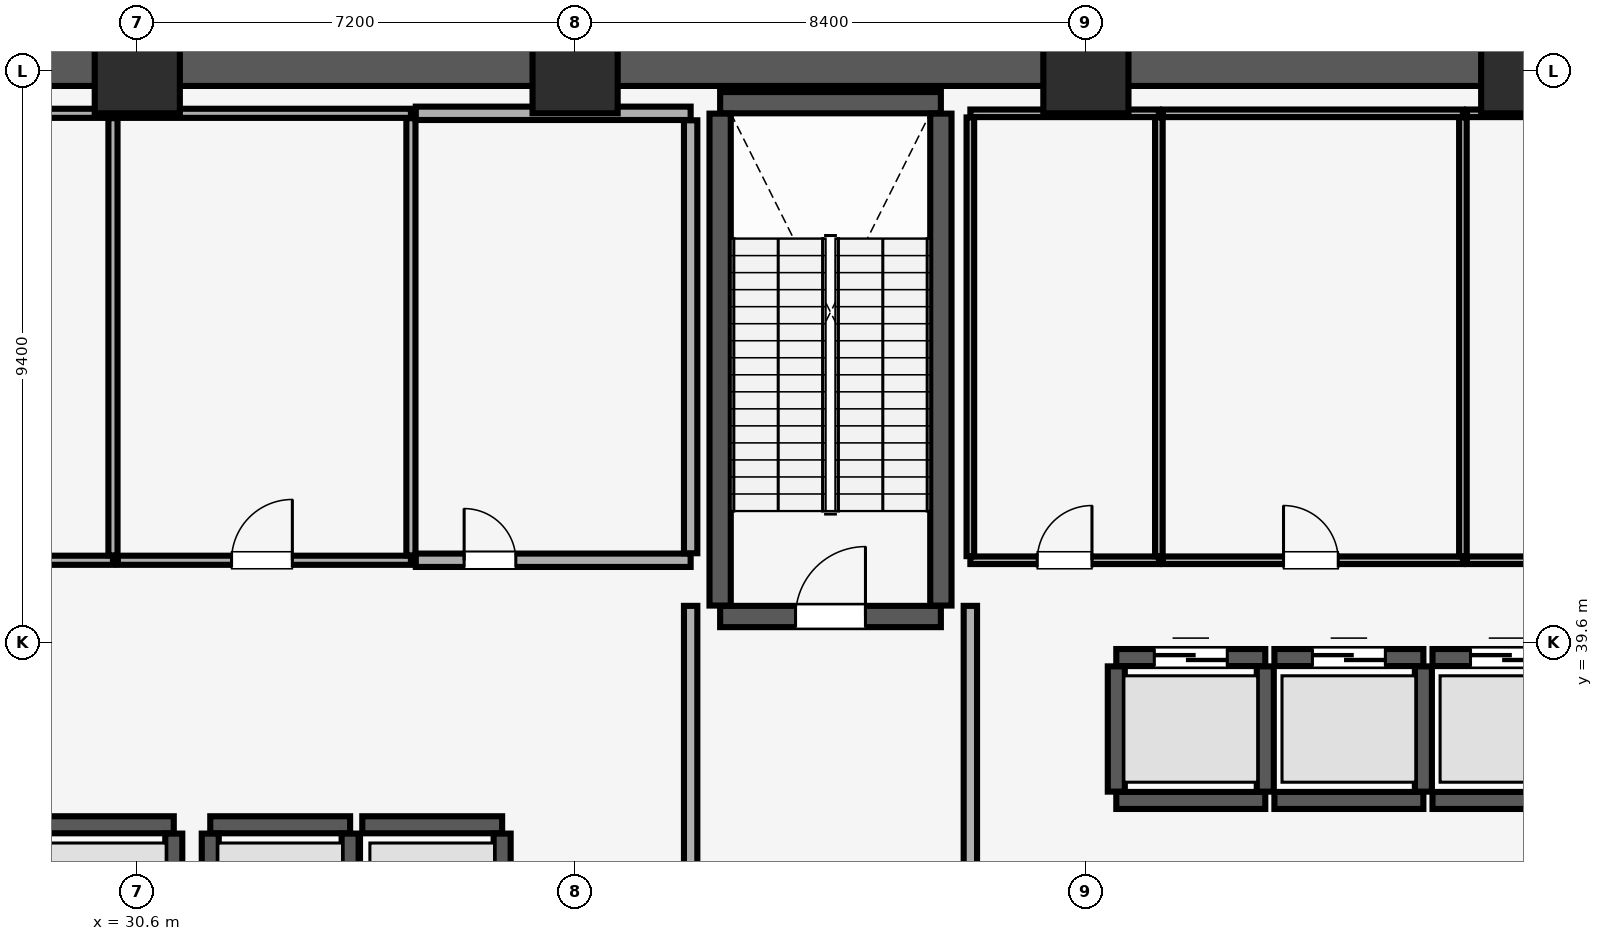
"""IFC4 building model, lengths in metres.
Left out: names, types, materials, properties, quantities, classifications, styles, units other than length and angle.
Written with IfcOpenShell. Run it as: python <this file> out.ifc"""

import sys

from ifc_helpers import new_model, si_unit, direction, frame, frame_2d, origin, origin_2d, place, context, subcontext, project, spatial, rectangle, extrude, element, fill, save


model = new_model("IFC4")
c1 = context("Model", 3, precision=1e-05, world=origin(), true_north=direction((0.0, 1.0)))
c2 = subcontext(c1, "Body", "Model", "MODEL_VIEW")
j1 = project(units=[si_unit("LENGTHUNIT", "METRE"), si_unit("PLANEANGLEUNIT", "RADIAN")], contexts=[c1])
p1 = place(None, origin())
s1 = spatial("IfcSite", under=j1, at=p1, CompositionType="ELEMENT")
p2 = place(p1, origin())
s2 = spatial("IfcBuilding", under=s1, at=p2, CompositionType="ELEMENT")
p3 = place(p2, frame((0.0, 0.0, 8.0)))
s3 = spatial("IfcBuildingStorey", under=s2, at=p3, CompositionType="ELEMENT", Elevation=8.0)
for number, where, z_axis, x_axis in (
    (1, (30.6, 49.0, 0.0), (0.0, 0.0, 1.0), (1.0, 0.0, 0.0)),
    (2, (37.8, 49.0, 0.0), (0.0, 0.0, 1.0), (1.0, 0.0, 0.0)),
    (3, (46.2, 49.0, 0.0), (0.0, 0.0, 1.0), (1.0, 0.0, 0.0)),
    (4, (53.4, 49.0, 0.0), (0.0, 0.0, 1.0), (1.0, 0.0, 0.0)),
):
    element("IfcColumn", number, at=place(p3, frame(where, z_axis=z_axis, x_axis=x_axis)), inside=s3, PredefinedType="COLUMN", context=c2, shape_type="SweptSolid", body=[
        extrude(rectangle(XDim=1.4, YDim=1.4, at=origin_2d()), origin(), (0.0, 0.0, 1.0), 5.68),
    ])
p4 = place(p3, frame((16.2, 49.3, 0.0), z_axis=(0.0, 0.0, 1.0), x_axis=(1.0, 0.0, 0.0)))
e5 = element("IfcWall", 5, at=p4, inside=s3, PredefinedType="SHEAR", context=c2, shape_type="SweptSolid", body=[
    extrude(rectangle(XDim=51.6, YDim=1.1, at=frame_2d((25.8, 0.0))), origin(), (0.0, 0.0, 1.0), 5.68),
])
p5 = place(p3, frame((40.185, 40.025, 0.0), z_axis=(0.0, 0.0, 1.0), x_axis=(1.0, 0.0, 0.0)))
e6 = element("IfcWall", 6, at=p5, inside=s3, PredefinedType="SHEAR", context=c2, shape_type="SweptSolid", body=[
    extrude(rectangle(XDim=3.63, YDim=0.35, at=frame_2d((1.815, 0.0))), origin(), (0.0, 0.0, 1.0), 5.68),
])
p6 = place(p5, frame((1.24, 0.0, 0.0)))
e7 = element("IfcOpeningElement", 7, at=p6, cuts=e6, PredefinedType="OPENING", context=c2, shape_type="SweptSolid", body=[
    extrude(rectangle(XDim=1.15, YDim=2.15, at=frame_2d((0.575, 1.075))), frame((0.0, 0.185, 0.0), z_axis=(0.0, -1.0, 0.0), x_axis=(1.0, 0.0, 0.0)), (0.0, 0.0, 1.0), 0.37),
])
p7 = place(p3, frame((40.185, 48.475, 0.0), z_axis=(0.0, 0.0, 1.0), x_axis=(1.0, 0.0, 0.0)))
e8 = element("IfcWall", 8, at=p7, inside=s3, PredefinedType="SHEAR", context=c2, shape_type="SweptSolid", body=[
    extrude(rectangle(XDim=3.63, YDim=0.35, at=frame_2d((1.815, 0.0))), origin(), (0.0, 0.0, 1.0), 5.68),
])
for number, where, z_axis, x_axis in (
    (9, (40.185, 40.205, 0.0), (0.0, 0.0, 1.0), (0.0, 1.0, 0.0)),
    (10, (43.815, 40.205, 0.0), (0.0, 0.0, 1.0), (0.0, 1.0, 0.0)),
):
    element("IfcWall", number, at=place(p3, frame(where, z_axis=z_axis, x_axis=x_axis)), inside=s3, PredefinedType="SHEAR", context=c2, shape_type="SweptSolid", body=[
        extrude(rectangle(XDim=8.09, YDim=0.35, at=frame_2d((4.045, 0.0))), origin(), (0.0, 0.0, 1.0), 5.68),
    ])
p8 = place(p3, frame((28.9, 36.6, 0.0), z_axis=(0.0, 0.0, 1.0), x_axis=(1.0, 0.0, 0.0)))
e11 = element("IfcWall", 11, at=p8, inside=s3, PredefinedType="SHEAR", context=c2, shape_type="SweptSolid", body=[
    extrude(rectangle(XDim=2.3, YDim=0.28, at=frame_2d((1.15, 0.0))), origin(), (0.0, 0.0, 1.0), 5.68),
])
p9 = place(p3, frame((31.2, 34.445, 0.0), z_axis=(0.0, 0.0, 1.0), x_axis=(0.0, 1.0, 0.0)))
e12 = element("IfcWall", 12, at=p9, inside=s3, PredefinedType="SHEAR", context=c2, shape_type="SweptSolid", body=[
    extrude(rectangle(XDim=2.01, YDim=0.28, at=frame_2d((1.005, 0.0))), origin(), (0.0, 0.0, 1.0), 5.68),
])
p10 = place(p3, frame((46.7, 37.0, 0.0), z_axis=(0.0, 0.0, 1.0), x_axis=(1.0, 0.0, 0.0)))
e13 = element("IfcWall", 13, at=p10, inside=s3, PredefinedType="SHEAR", context=c2, shape_type="SweptSolid", body=[
    extrude(rectangle(XDim=2.45, YDim=0.28, at=frame_2d((1.225, 0.0))), origin(), (0.0, 0.0, 1.0), 5.68),
])
p11 = place(p3, frame((46.7, 39.35, 0.0), z_axis=(0.0, 0.0, 1.0), x_axis=(1.0, 0.0, 0.0)))
e14 = element("IfcWall", 14, at=p11, inside=s3, PredefinedType="SHEAR", context=c2, shape_type="SweptSolid", body=[
    extrude(rectangle(XDim=2.45, YDim=0.28, at=frame_2d((1.225, 0.0))), origin(), (0.0, 0.0, 1.0), 5.68),
])
p12 = place(p11, frame((0.625, 0.0, 0.0)))
e15 = element("IfcOpeningElement", 15, at=p12, cuts=e14, PredefinedType="OPENING", context=c2, shape_type="SweptSolid", body=[
    extrude(rectangle(XDim=1.2, YDim=2.25, at=frame_2d((0.6, 1.125))), frame((0.0, 0.15, 0.0), z_axis=(0.0, -1.0, 0.0), x_axis=(1.0, 0.0, 0.0)), (0.0, 0.0, 1.0), 0.3),
])
for number, where, z_axis, x_axis in (
    (16, (46.7, 37.145, 0.0), (0.0, 0.0, 1.0), (0.0, 1.0, 0.0)),
    (17, (49.15, 37.145, 0.0), (0.0, 0.0, 1.0), (0.0, 1.0, 0.0)),
):
    element("IfcWall", number, at=place(p3, frame(where, z_axis=z_axis, x_axis=x_axis)), inside=s3, PredefinedType="SHEAR", context=c2, shape_type="SweptSolid", body=[
        extrude(rectangle(XDim=2.06, YDim=0.28, at=frame_2d((1.03, 0.0))), origin(), (0.0, 0.0, 1.0), 5.68),
    ])
p13 = place(p3, frame((49.3, 37.0, 0.0), z_axis=(0.0, 0.0, 1.0), x_axis=(1.0, 0.0, 0.0)))
e18 = element("IfcWall", 18, at=p13, inside=s3, PredefinedType="SHEAR", context=c2, shape_type="SweptSolid", body=[
    extrude(rectangle(XDim=2.45, YDim=0.28, at=frame_2d((1.225, 0.0))), origin(), (0.0, 0.0, 1.0), 5.68),
])
p14 = place(p3, frame((49.3, 39.35, 0.0), z_axis=(0.0, 0.0, 1.0), x_axis=(1.0, 0.0, 0.0)))
e19 = element("IfcWall", 19, at=p14, inside=s3, PredefinedType="SHEAR", context=c2, shape_type="SweptSolid", body=[
    extrude(rectangle(XDim=2.45, YDim=0.28, at=frame_2d((1.225, 0.0))), origin(), (0.0, 0.0, 1.0), 5.68),
])
p15 = place(p14, frame((0.625, 0.0, 0.0)))
e20 = element("IfcOpeningElement", 20, at=p15, cuts=e19, PredefinedType="OPENING", context=c2, shape_type="SweptSolid", body=[
    extrude(rectangle(XDim=1.2, YDim=2.25, at=frame_2d((0.6, 1.125))), frame((0.0, 0.15, 0.0), z_axis=(0.0, -1.0, 0.0), x_axis=(1.0, 0.0, 0.0)), (0.0, 0.0, 1.0), 0.3),
])
p16 = place(p3, frame((51.75, 37.145, 0.0), z_axis=(0.0, 0.0, 1.0), x_axis=(0.0, 1.0, 0.0)))
e21 = element("IfcWall", 21, at=p16, inside=s3, PredefinedType="SHEAR", context=c2, shape_type="SweptSolid", body=[
    extrude(rectangle(XDim=2.06, YDim=0.28, at=frame_2d((1.03, 0.0))), origin(), (0.0, 0.0, 1.0), 5.68),
])
p17 = place(p3, frame((51.9, 37.0, 0.0), z_axis=(0.0, 0.0, 1.0), x_axis=(1.0, 0.0, 0.0)))
e22 = element("IfcWall", 22, at=p17, inside=s3, PredefinedType="SHEAR", context=c2, shape_type="SweptSolid", body=[
    extrude(rectangle(XDim=2.59, YDim=0.28, at=frame_2d((1.295, 0.0))), origin(), (0.0, 0.0, 1.0), 5.68),
])
p18 = place(p3, frame((51.9, 39.35, 0.0), z_axis=(0.0, 0.0, 1.0), x_axis=(1.0, 0.0, 0.0)))
e23 = element("IfcWall", 23, at=p18, inside=s3, PredefinedType="SHEAR", context=c2, shape_type="SweptSolid", body=[
    extrude(rectangle(XDim=2.59, YDim=0.28, at=frame_2d((1.295, 0.0))), origin(), (0.0, 0.0, 1.0), 5.68),
])
p19 = place(p18, frame((0.625, 0.0, 0.0)))
e24 = element("IfcOpeningElement", 24, at=p19, cuts=e23, PredefinedType="OPENING", context=c2, shape_type="SweptSolid", body=[
    extrude(rectangle(XDim=1.2, YDim=2.25, at=frame_2d((0.6, 1.125))), frame((0.0, 0.15, 0.0), z_axis=(0.0, -1.0, 0.0), x_axis=(1.0, 0.0, 0.0)), (0.0, 0.0, 1.0), 0.3),
])
p20 = place(p3, frame((31.8, 36.6, 0.0), z_axis=(0.0, 0.0, 1.0), x_axis=(1.0, 0.0, 0.0)))
e25 = element("IfcWall", 25, at=p20, inside=s3, PredefinedType="SHEAR", context=c2, shape_type="SweptSolid", body=[
    extrude(rectangle(XDim=2.3, YDim=0.28, at=frame_2d((1.15, 0.0))), origin(), (0.0, 0.0, 1.0), 5.68),
])
for number, where, z_axis, x_axis in (
    (26, (31.8, 34.445, 0.0), (0.0, 0.0, 1.0), (0.0, 1.0, 0.0)),
    (27, (34.1, 34.445, 0.0), (0.0, 0.0, 1.0), (0.0, 1.0, 0.0)),
):
    element("IfcWall", number, at=place(p3, frame(where, z_axis=z_axis, x_axis=x_axis)), inside=s3, PredefinedType="SHEAR", context=c2, shape_type="SweptSolid", body=[
        extrude(rectangle(XDim=2.01, YDim=0.28, at=frame_2d((1.005, 0.0))), origin(), (0.0, 0.0, 1.0), 5.68),
    ])
p21 = place(p3, frame((34.3, 36.6, 0.0), z_axis=(0.0, 0.0, 1.0), x_axis=(1.0, 0.0, 0.0)))
e28 = element("IfcWall", 28, at=p21, inside=s3, PredefinedType="SHEAR", context=c2, shape_type="SweptSolid", body=[
    extrude(rectangle(XDim=2.3, YDim=0.28, at=frame_2d((1.15, 0.0))), origin(), (0.0, 0.0, 1.0), 5.68),
])
p22 = place(p3, frame((36.6, 34.445, 0.0), z_axis=(0.0, 0.0, 1.0), x_axis=(0.0, 1.0, 0.0)))
e29 = element("IfcWall", 29, at=p22, inside=s3, PredefinedType="SHEAR", context=c2, shape_type="SweptSolid", body=[
    extrude(rectangle(XDim=2.01, YDim=0.28, at=frame_2d((1.005, 0.0))), origin(), (0.0, 0.0, 1.0), 5.68),
])
for number, where, z_axis, x_axis in (
    (30, (39.7, 34.415, 0.0), (0.0, 0.0, 1.0), (0.0, 1.0, 0.0)),
    (31, (44.3, 34.415, 0.0), (0.0, 0.0, 1.0), (0.0, 1.0, 0.0)),
):
    element("IfcWall", number, at=place(p3, frame(where, z_axis=z_axis, x_axis=x_axis)), inside=s3, PredefinedType="PARTITIONING", context=c2, shape_type="SweptSolid", body=[
        extrude(rectangle(XDim=5.785, YDim=0.22, at=frame_2d((2.893, 0.0))), origin(), (0.0, 0.0, 1.0), 5.68),
    ])
p23 = place(p3, frame((25.0, 40.95, 0.0), z_axis=(0.0, 0.0, 1.0), x_axis=(1.0, 0.0, 0.0)))
e32 = element("IfcWall", 32, at=p23, inside=s3, PredefinedType="PARTITIONING", context=c2, shape_type="SweptSolid", body=[
    extrude(rectangle(XDim=5.2, YDim=0.15, at=frame_2d((2.6, 0.0))), origin(), (0.0, 0.0, 1.0), 5.68),
])
p24 = place(p23, frame((2.175, 0.0, 0.0)))
e33 = element("IfcOpeningElement", 33, at=p24, cuts=e32, PredefinedType="OPENING", context=c2, shape_type="SweptSolid", body=[
    extrude(rectangle(XDim=0.85, YDim=2.1, at=frame_2d((0.425, 1.05))), frame((0.0, 0.085, 0.0), z_axis=(0.0, -1.0, 0.0), x_axis=(1.0, 0.0, 0.0)), (0.0, 0.0, 1.0), 0.17),
])
p25 = place(p3, frame((25.0, 48.3, 0.0), z_axis=(0.0, 0.0, 1.0), x_axis=(1.0, 0.0, 0.0)))
e34 = element("IfcWall", 34, at=p25, inside=s3, PredefinedType="PARTITIONING", context=c2, shape_type="SweptSolid", body=[
    extrude(rectangle(XDim=5.2, YDim=0.15, at=frame_2d((2.6, 0.0))), origin(), (0.0, 0.0, 1.0), 5.68),
])
p26 = place(p3, frame((30.2, 41.03, 0.0), z_axis=(0.0, 0.0, 1.0), x_axis=(0.0, 1.0, 0.0)))
e35 = element("IfcWall", 35, at=p26, inside=s3, PredefinedType="PARTITIONING", context=c2, shape_type="SweptSolid", body=[
    extrude(rectangle(XDim=7.19, YDim=0.15, at=frame_2d((3.595, 0.0))), origin(), (0.0, 0.0, 1.0), 5.68),
])
p27 = place(p3, frame((30.28, 40.95, 0.0), z_axis=(0.0, 0.0, 1.0), x_axis=(1.0, 0.0, 0.0)))
e36 = element("IfcWall", 36, at=p27, inside=s3, PredefinedType="PARTITIONING", context=c2, shape_type="SweptSolid", body=[
    extrude(rectangle(XDim=4.82, YDim=0.15, at=frame_2d((2.41, 0.0))), origin(), (0.0, 0.0, 1.0), 5.68),
])
p28 = place(p27, frame((1.87, 0.0, 0.0)))
e37 = element("IfcOpeningElement", 37, at=p28, cuts=e36, PredefinedType="OPENING", context=c2, shape_type="SweptSolid", body=[
    extrude(rectangle(XDim=1.0, YDim=2.15, at=frame_2d((0.5, 1.075))), frame((0.0, 0.085, 0.0), z_axis=(0.0, -1.0, 0.0), x_axis=(1.0, 0.0, 0.0)), (0.0, 0.0, 1.0), 0.17),
])
p29 = place(p3, frame((30.28, 48.3, 0.0), z_axis=(0.0, 0.0, 1.0), x_axis=(1.0, 0.0, 0.0)))
e38 = element("IfcWall", 38, at=p29, inside=s3, PredefinedType="PARTITIONING", context=c2, shape_type="SweptSolid", body=[
    extrude(rectangle(XDim=4.82, YDim=0.15, at=frame_2d((2.41, 0.0))), origin(), (0.0, 0.0, 1.0), 5.68),
])
p30 = place(p3, frame((35.1, 41.03, 0.0), z_axis=(0.0, 0.0, 1.0), x_axis=(0.0, 1.0, 0.0)))
e39 = element("IfcWall", 39, at=p30, inside=s3, PredefinedType="PARTITIONING", context=c2, shape_type="SweptSolid", body=[
    extrude(rectangle(XDim=7.19, YDim=0.15, at=frame_2d((3.595, 0.0))), origin(), (0.0, 0.0, 1.0), 5.68),
])
p31 = place(p3, frame((35.18, 40.95, 0.0), z_axis=(0.0, 0.0, 1.0), x_axis=(1.0, 0.0, 0.0)))
e40 = element("IfcWall", 40, at=p31, inside=s3, PredefinedType="PARTITIONING", context=c2, shape_type="SweptSolid", body=[
    extrude(rectangle(XDim=4.52, YDim=0.22, at=frame_2d((2.26, 0.0))), origin(), (0.0, 0.0, 1.0), 5.68),
])
p32 = place(p31, frame((0.795, 0.0, 0.0)))
e41 = element("IfcOpeningElement", 41, at=p32, cuts=e40, PredefinedType="OPENING", context=c2, shape_type="SweptSolid", body=[
    extrude(rectangle(XDim=0.85, YDim=2.1, at=frame_2d((0.425, 1.05))), frame((0.0, 0.12, 0.0), z_axis=(0.0, -1.0, 0.0), x_axis=(1.0, 0.0, 0.0)), (0.0, 0.0, 1.0), 0.24),
])
p33 = place(p3, frame((35.18, 48.3, 0.0), z_axis=(0.0, 0.0, 1.0), x_axis=(1.0, 0.0, 0.0)))
e42 = element("IfcWall", 42, at=p33, inside=s3, PredefinedType="PARTITIONING", context=c2, shape_type="SweptSolid", body=[
    extrude(rectangle(XDim=4.52, YDim=0.22, at=frame_2d((2.26, 0.0))), origin(), (0.0, 0.0, 1.0), 5.68),
])
p34 = place(p3, frame((39.7, 41.065, 0.0), z_axis=(0.0, 0.0, 1.0), x_axis=(0.0, 1.0, 0.0)))
e43 = element("IfcWall", 43, at=p34, inside=s3, PredefinedType="PARTITIONING", context=c2, shape_type="SweptSolid", body=[
    extrude(rectangle(XDim=7.12, YDim=0.22, at=frame_2d((3.56, 0.0))), origin(), (0.0, 0.0, 1.0), 5.68),
])
p35 = place(p3, frame((44.3, 40.95, 0.0), z_axis=(0.0, 0.0, 1.0), x_axis=(1.0, 0.0, 0.0)))
e44 = element("IfcWall", 44, at=p35, inside=s3, PredefinedType="PARTITIONING", context=c2, shape_type="SweptSolid", body=[
    extrude(rectangle(XDim=3.1, YDim=0.125, at=frame_2d((1.55, 0.0))), origin(), (0.0, 0.0, 1.0), 5.68),
])
p36 = place(p35, frame((1.1, 0.0, 0.0)))
e45 = element("IfcOpeningElement", 45, at=p36, cuts=e44, PredefinedType="OPENING", context=c2, shape_type="SweptSolid", body=[
    extrude(rectangle(XDim=0.9, YDim=2.1, at=frame_2d((0.45, 1.05))), frame((0.0, 0.073, 0.0), z_axis=(0.0, -1.0, 0.0), x_axis=(1.0, 0.0, 0.0)), (0.0, 0.0, 1.0), 0.145),
])
p37 = place(p3, frame((44.3, 48.3, 0.0), z_axis=(0.0, 0.0, 1.0), x_axis=(1.0, 0.0, 0.0)))
e46 = element("IfcWall", 46, at=p37, inside=s3, PredefinedType="PARTITIONING", context=c2, shape_type="SweptSolid", body=[
    extrude(rectangle(XDim=3.1, YDim=0.125, at=frame_2d((1.55, 0.0))), origin(), (0.0, 0.0, 1.0), 5.68),
])
for number, where, z_axis, x_axis in (
    (47, (44.3, 41.018, 0.0), (0.0, 0.0, 1.0), (0.0, 1.0, 0.0)),
    (48, (47.4, 41.018, 0.0), (0.0, 0.0, 1.0), (0.0, 1.0, 0.0)),
):
    element("IfcWall", number, at=place(p3, frame(where, z_axis=z_axis, x_axis=x_axis)), inside=s3, PredefinedType="PARTITIONING", context=c2, shape_type="SweptSolid", body=[
        extrude(rectangle(XDim=7.215, YDim=0.125, at=frame_2d((3.607, 0.0))), origin(), (0.0, 0.0, 1.0), 5.68),
    ])
p38 = place(p3, frame((47.468, 40.95, 0.0), z_axis=(0.0, 0.0, 1.0), x_axis=(1.0, 0.0, 0.0)))
e49 = element("IfcWall", 49, at=p38, inside=s3, PredefinedType="PARTITIONING", context=c2, shape_type="SweptSolid", body=[
    extrude(rectangle(XDim=4.932, YDim=0.125, at=frame_2d((2.466, 0.0))), origin(), (0.0, 0.0, 1.0), 5.68),
])
p39 = place(p38, frame((1.982, 0.0, 0.0)))
e50 = element("IfcOpeningElement", 50, at=p39, cuts=e49, PredefinedType="OPENING", context=c2, shape_type="SweptSolid", body=[
    extrude(rectangle(XDim=0.9, YDim=2.1, at=frame_2d((0.45, 1.05))), frame((0.0, 0.073, 0.0), z_axis=(0.0, -1.0, 0.0), x_axis=(1.0, 0.0, 0.0)), (0.0, 0.0, 1.0), 0.145),
])
p40 = place(p3, frame((47.468, 48.3, 0.0), z_axis=(0.0, 0.0, 1.0), x_axis=(1.0, 0.0, 0.0)))
e51 = element("IfcWall", 51, at=p40, inside=s3, PredefinedType="PARTITIONING", context=c2, shape_type="SweptSolid", body=[
    extrude(rectangle(XDim=4.932, YDim=0.125, at=frame_2d((2.466, 0.0))), origin(), (0.0, 0.0, 1.0), 5.68),
])
p41 = place(p3, frame((52.4, 41.018, 0.0), z_axis=(0.0, 0.0, 1.0), x_axis=(0.0, 1.0, 0.0)))
e52 = element("IfcWall", 52, at=p41, inside=s3, PredefinedType="PARTITIONING", context=c2, shape_type="SweptSolid", body=[
    extrude(rectangle(XDim=7.215, YDim=0.125, at=frame_2d((3.607, 0.0))), origin(), (0.0, 0.0, 1.0), 5.68),
])
p42 = place(p3, frame((52.468, 40.95, 0.0), z_axis=(0.0, 0.0, 1.0), x_axis=(1.0, 0.0, 0.0)))
e53 = element("IfcWall", 53, at=p42, inside=s3, PredefinedType="PARTITIONING", context=c2, shape_type="SweptSolid", body=[
    extrude(rectangle(XDim=5.032, YDim=0.125, at=frame_2d((2.516, 0.0))), origin(), (0.0, 0.0, 1.0), 5.68),
])
p43 = place(p42, frame((2.032, 0.0, 0.0)))
e54 = element("IfcOpeningElement", 54, at=p43, cuts=e53, PredefinedType="OPENING", context=c2, shape_type="SweptSolid", body=[
    extrude(rectangle(XDim=0.9, YDim=2.1, at=frame_2d((0.45, 1.05))), frame((0.0, 0.073, 0.0), z_axis=(0.0, -1.0, 0.0), x_axis=(1.0, 0.0, 0.0)), (0.0, 0.0, 1.0), 0.145),
])
p44 = place(p3, frame((52.468, 48.3, 0.0), z_axis=(0.0, 0.0, 1.0), x_axis=(1.0, 0.0, 0.0)))
e55 = element("IfcWall", 55, at=p44, inside=s3, PredefinedType="PARTITIONING", context=c2, shape_type="SweptSolid", body=[
    extrude(rectangle(XDim=5.022, YDim=0.125, at=frame_2d((2.511, 0.0))), origin(), (0.0, 0.0, 1.0), 5.68),
])
p45 = place(p6, origin())
e56 = element("IfcDoor", 56, at=p45, inside=s3, OperationType="SINGLE_SWING_RIGHT", PredefinedType="DOOR", context=c2, shape_type="SweptSolid", body=[
    extrude(rectangle(XDim=1.15, YDim=2.15, at=frame_2d((0.575, 1.075))), frame((0.0, 0.025, 0.0), z_axis=(0.0, -1.0, 0.0), x_axis=(1.0, 0.0, 0.0)), (0.0, 0.0, 1.0), 0.05),
])
fill(e7, e56)
p46 = place(p12, origin())
e57 = element("IfcDoor", 57, at=p46, inside=s3, OperationType="DOUBLE_DOOR_SLIDING", PredefinedType="DOOR", context=c2, shape_type="SweptSolid", body=[
    extrude(rectangle(XDim=1.2, YDim=2.25, at=frame_2d((0.6, 1.125))), frame((0.0, 0.025, 0.0), z_axis=(0.0, -1.0, 0.0), x_axis=(1.0, 0.0, 0.0)), (0.0, 0.0, 1.0), 0.05),
])
fill(e15, e57)
p47 = place(p15, origin())
e58 = element("IfcDoor", 58, at=p47, inside=s3, OperationType="DOUBLE_DOOR_SLIDING", PredefinedType="DOOR", context=c2, shape_type="SweptSolid", body=[
    extrude(rectangle(XDim=1.2, YDim=2.25, at=frame_2d((0.6, 1.125))), frame((0.0, 0.025, 0.0), z_axis=(0.0, -1.0, 0.0), x_axis=(1.0, 0.0, 0.0)), (0.0, 0.0, 1.0), 0.05),
])
fill(e20, e58)
p48 = place(p19, origin())
e59 = element("IfcDoor", 59, at=p48, inside=s3, OperationType="DOUBLE_DOOR_SLIDING", PredefinedType="DOOR", context=c2, shape_type="SweptSolid", body=[
    extrude(rectangle(XDim=1.2, YDim=2.25, at=frame_2d((0.6, 1.125))), frame((0.0, 0.025, 0.0), z_axis=(0.0, -1.0, 0.0), x_axis=(1.0, 0.0, 0.0)), (0.0, 0.0, 1.0), 0.05),
])
fill(e24, e59)
p49 = place(p28, origin())
e60 = element("IfcDoor", 60, at=p49, inside=s3, OperationType="SINGLE_SWING_RIGHT", PredefinedType="DOOR", context=c2, shape_type="SweptSolid", body=[
    extrude(rectangle(XDim=1.0, YDim=2.15, at=frame_2d((0.5, 1.075))), frame((0.0, 0.025, 0.0), z_axis=(0.0, -1.0, 0.0), x_axis=(1.0, 0.0, 0.0)), (0.0, 0.0, 1.0), 0.05),
])
fill(e37, e60)
p50 = place(p32, origin())
e61 = element("IfcDoor", 61, at=p50, inside=s3, OperationType="SINGLE_SWING_LEFT", PredefinedType="DOOR", context=c2, shape_type="SweptSolid", body=[
    extrude(rectangle(XDim=0.85, YDim=2.1, at=frame_2d((0.425, 1.05))), frame((0.0, 0.025, 0.0), z_axis=(0.0, -1.0, 0.0), x_axis=(1.0, 0.0, 0.0)), (0.0, 0.0, 1.0), 0.05),
])
fill(e41, e61)
p51 = place(p36, origin())
e62 = element("IfcDoor", 62, at=p51, inside=s3, OperationType="SINGLE_SWING_RIGHT", PredefinedType="DOOR", context=c2, shape_type="SweptSolid", body=[
    extrude(rectangle(XDim=0.9, YDim=2.1, at=frame_2d((0.45, 1.05))), frame((0.0, 0.025, 0.0), z_axis=(0.0, -1.0, 0.0), x_axis=(1.0, 0.0, 0.0)), (0.0, 0.0, 1.0), 0.05),
])
fill(e45, e62)
p52 = place(p39, origin())
e63 = element("IfcDoor", 63, at=p52, inside=s3, OperationType="SINGLE_SWING_LEFT", PredefinedType="DOOR", context=c2, shape_type="SweptSolid", body=[
    extrude(rectangle(XDim=0.9, YDim=2.1, at=frame_2d((0.45, 1.05))), frame((0.0, 0.025, 0.0), z_axis=(0.0, -1.0, 0.0), x_axis=(1.0, 0.0, 0.0)), (0.0, 0.0, 1.0), 0.05),
])
fill(e50, e63)
save(model, sys.argv[1])
